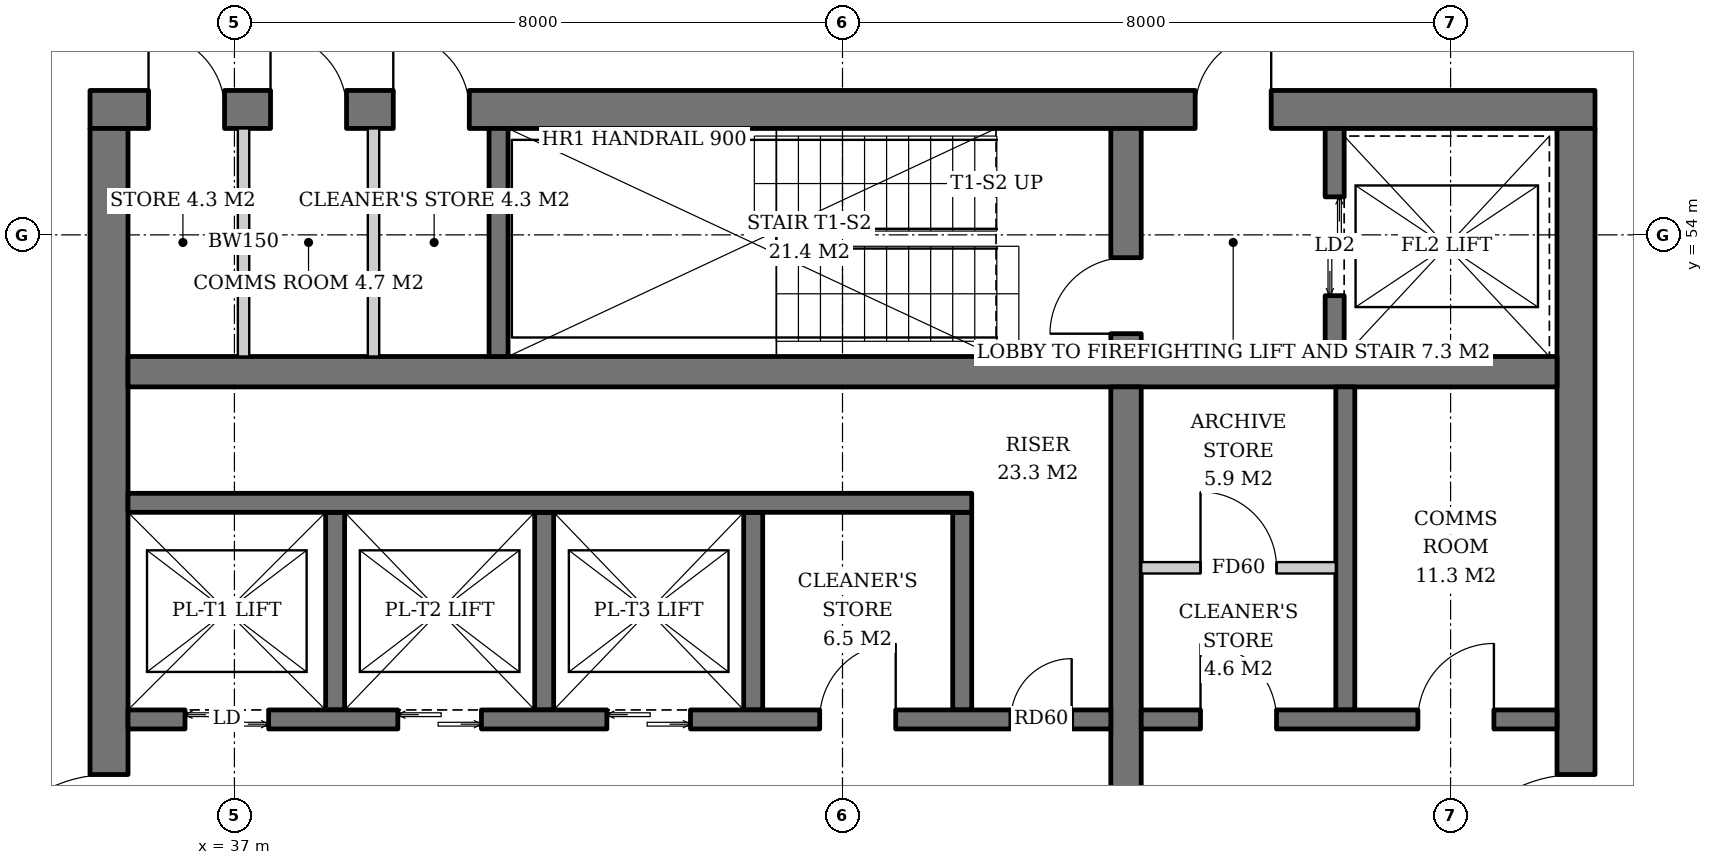
"""IFC4 building model, lengths in metres.
Left out: names, types, materials, properties, quantities, classifications, styles, units other than length and angle.
Written with IfcOpenShell. Run it as: python <this file> out.ifc"""

import sys

from ifc_helpers import new_model, si_unit, direction, frame, frame_2d, origin, place, context, subcontext, project, spatial, rectangle, extrude, element, fill, save


model = new_model("IFC4")
c1 = context("Model", 3, precision=1e-05, world=origin(), true_north=direction((0.0, 1.0)))
c2 = subcontext(c1, "Body", "Model", "MODEL_VIEW")
j1 = project(units=[si_unit("LENGTHUNIT", "METRE"), si_unit("PLANEANGLEUNIT", "RADIAN")], contexts=[c1])
p1 = place(None, origin())
s1 = spatial("IfcSite", under=j1, at=p1, CompositionType="ELEMENT")
p2 = place(p1, origin())
s2 = spatial("IfcBuilding", under=s1, at=p2, CompositionType="ELEMENT")
p3 = place(p2, frame((0.0, 0.0, 249.0)))
s3 = spatial("IfcBuildingStorey", under=s2, at=p3, CompositionType="ELEMENT", Elevation=249.0)
p4 = place(p3, frame((35.1, 55.65, 0.0), z_axis=(0.0, 0.0, 1.0), x_axis=(1.0, 0.0, 0.0)))
e1 = element("IfcWall", 1, at=p4, inside=s3, PredefinedType="SHEAR", context=c2, shape_type="SweptSolid", body=[
    extrude(rectangle(XDim=19.8, YDim=0.5, at=frame_2d((9.9, 0.0))), origin(), (0.0, 0.0, 1.0), 3.8),
])
p5 = place(p4, frame((14.54, 0.0, 0.0)))
e2 = element("IfcOpeningElement", 2, at=p5, cuts=e1, PredefinedType="OPENING", context=c2, shape_type="SweptSolid", body=[
    extrude(rectangle(XDim=1.0, YDim=2.1, at=frame_2d((0.5, 1.05))), frame((0.0, 0.26, 0.0), z_axis=(0.0, -1.0, 0.0), x_axis=(1.0, 0.0, 0.0)), (0.0, 0.0, 1.0), 0.52),
])
p6 = place(p4, frame((0.77, 0.0, 0.0)))
e3 = element("IfcOpeningElement", 3, at=p6, cuts=e1, PredefinedType="OPENING", context=c2, shape_type="SweptSolid", body=[
    extrude(rectangle(XDim=1.0, YDim=2.1, at=frame_2d((0.5, 1.05))), frame((0.0, 0.26, 0.0), z_axis=(0.0, -1.0, 0.0), x_axis=(1.0, 0.0, 0.0)), (0.0, 0.0, 1.0), 0.52),
])
p7 = place(p4, frame((2.375, 0.0, 0.0)))
e4 = element("IfcOpeningElement", 4, at=p7, cuts=e1, PredefinedType="OPENING", context=c2, shape_type="SweptSolid", body=[
    extrude(rectangle(XDim=1.0, YDim=2.1, at=frame_2d((0.5, 1.05))), frame((0.0, 0.26, 0.0), z_axis=(0.0, -1.0, 0.0), x_axis=(1.0, 0.0, 0.0)), (0.0, 0.0, 1.0), 0.52),
])
p8 = place(p4, frame((3.99, 0.0, 0.0)))
e5 = element("IfcOpeningElement", 5, at=p8, cuts=e1, PredefinedType="OPENING", context=c2, shape_type="SweptSolid", body=[
    extrude(rectangle(XDim=1.0, YDim=2.1, at=frame_2d((0.5, 1.05))), frame((0.0, 0.26, 0.0), z_axis=(0.0, -1.0, 0.0), x_axis=(1.0, 0.0, 0.0)), (0.0, 0.0, 1.0), 0.52),
])
p9 = place(p3, frame((35.35, 36.6, 0.0), z_axis=(0.0, 0.0, 1.0), x_axis=(0.0, 1.0, 0.0)))
e6 = element("IfcWall", 6, at=p9, inside=s3, PredefinedType="SHEAR", context=c2, shape_type="SweptSolid", body=[
    extrude(rectangle(XDim=18.8, YDim=0.5, at=frame_2d((9.4, 0.0))), origin(), (0.0, 0.0, 1.0), 3.8),
])
p10 = place(p9, frame((8.5, 0.0, 0.0)))
e7 = element("IfcOpeningElement", 7, at=p10, cuts=e6, PredefinedType="OPENING", context=c2, shape_type="SweptSolid", body=[
    extrude(rectangle(XDim=1.8, YDim=2.4, at=frame_2d((0.9, 1.2))), frame((0.0, 0.26, 0.0), z_axis=(0.0, -1.0, 0.0), x_axis=(1.0, 0.0, 0.0)), (0.0, 0.0, 1.0), 0.52),
])
p11 = place(p3, frame((54.65, 36.6, 0.0), z_axis=(0.0, 0.0, 1.0), x_axis=(0.0, 1.0, 0.0)))
e8 = element("IfcWall", 8, at=p11, inside=s3, PredefinedType="SHEAR", context=c2, shape_type="SweptSolid", body=[
    extrude(rectangle(XDim=18.8, YDim=0.5, at=frame_2d((9.4, 0.0))), origin(), (0.0, 0.0, 1.0), 3.8),
])
p12 = place(p11, frame((8.5, 0.0, 0.0)))
e9 = element("IfcOpeningElement", 9, at=p12, cuts=e8, PredefinedType="OPENING", context=c2, shape_type="SweptSolid", body=[
    extrude(rectangle(XDim=1.8, YDim=2.4, at=frame_2d((0.9, 1.2))), frame((0.0, 0.26, 0.0), z_axis=(0.0, -1.0, 0.0), x_axis=(1.0, 0.0, 0.0)), (0.0, 0.0, 1.0), 0.52),
])
p13 = place(p3, frame((35.6, 52.2, 0.0), z_axis=(0.0, 0.0, 1.0), x_axis=(1.0, 0.0, 0.0)))
e10 = element("IfcWall", 10, at=p13, inside=s3, PredefinedType="SHEAR", context=c2, shape_type="SweptSolid", body=[
    extrude(rectangle(XDim=18.8, YDim=0.4, at=frame_2d((9.4, 0.0))), origin(), (0.0, 0.0, 1.0), 3.8),
])
p14 = place(p3, frame((48.73, 40.0, 0.0), z_axis=(0.0, 0.0, 1.0), x_axis=(0.0, 1.0, 0.0)))
e11 = element("IfcWall", 11, at=p14, inside=s3, PredefinedType="SHEAR", context=c2, shape_type="SweptSolid", body=[
    extrude(rectangle(XDim=12.0, YDim=0.4, at=frame_2d((6.0, 0.0))), origin(), (0.0, 0.0, 1.0), 3.8),
])
p15 = place(p3, frame((48.73, 52.4, 0.0), z_axis=(0.0, 0.0, 1.0), x_axis=(0.0, 1.0, 0.0)))
e12 = element("IfcWall", 12, at=p15, inside=s3, PredefinedType="SHEAR", context=c2, shape_type="SweptSolid", body=[
    extrude(rectangle(XDim=3.0, YDim=0.4, at=frame_2d((1.5, 0.0))), origin(), (0.0, 0.0, 1.0), 3.8),
])
p16 = place(p15, frame((0.3, 0.0, 0.0)))
e13 = element("IfcOpeningElement", 13, at=p16, cuts=e12, PredefinedType="OPENING", context=c2, shape_type="SweptSolid", body=[
    extrude(rectangle(XDim=1.0, YDim=2.1, at=frame_2d((0.5, 1.05))), frame((0.0, 0.21, 0.0), z_axis=(0.0, -1.0, 0.0), x_axis=(1.0, 0.0, 0.0)), (0.0, 0.0, 1.0), 0.42),
])
p17 = place(p3, frame((40.475, 52.4, 0.0), z_axis=(0.0, 0.0, 1.0), x_axis=(0.0, 1.0, 0.0)))
e14 = element("IfcWall", 14, at=p17, inside=s3, PredefinedType="SHEAR", context=c2, shape_type="SweptSolid", body=[
    extrude(rectangle(XDim=3.0, YDim=0.25, at=frame_2d((1.5, 0.0))), origin(), (0.0, 0.0, 1.0), 3.8),
])
p18 = place(p3, frame((51.475, 52.4, 0.0), z_axis=(0.0, 0.0, 1.0), x_axis=(0.0, 1.0, 0.0)))
e15 = element("IfcWall", 15, at=p18, inside=s3, PredefinedType="SHEAR", context=c2, shape_type="SweptSolid", body=[
    extrude(rectangle(XDim=3.0, YDim=0.25, at=frame_2d((1.5, 0.0))), origin(), (0.0, 0.0, 1.0), 3.8),
])
p19 = place(p18, frame((0.8, 0.0, 0.0)))
e16 = element("IfcOpeningElement", 16, at=p19, cuts=e15, PredefinedType="OPENING", context=c2, shape_type="SweptSolid", body=[
    extrude(rectangle(XDim=1.3, YDim=2.2, at=frame_2d((0.65, 1.1))), frame((0.0, 0.135, 0.0), z_axis=(0.0, -1.0, 0.0), x_axis=(1.0, 0.0, 0.0)), (0.0, 0.0, 1.0), 0.27),
])
for number, where, z_axis, x_axis in (
    (17, (38.325, 47.75, 0.0), (0.0, 0.0, 1.0), (0.0, 1.0, 0.0)),
    (18, (41.075, 47.75, 0.0), (0.0, 0.0, 1.0), (0.0, 1.0, 0.0)),
    (19, (43.825, 47.75, 0.0), (0.0, 0.0, 1.0), (0.0, 1.0, 0.0)),
    (20, (46.575, 47.75, 0.0), (0.0, 0.0, 1.0), (0.0, 1.0, 0.0)),
):
    element("IfcWall", number, at=place(p3, frame(where, z_axis=z_axis, x_axis=x_axis)), inside=s3, PredefinedType="SHEAR", context=c2, shape_type="SweptSolid", body=[
        extrude(rectangle(XDim=2.6, YDim=0.25, at=frame_2d((1.3, 0.0))), origin(), (0.0, 0.0, 1.0), 3.8),
    ])
p20 = place(p3, frame((35.6, 50.475, 0.0), z_axis=(0.0, 0.0, 1.0), x_axis=(1.0, 0.0, 0.0)))
e21 = element("IfcWall", 21, at=p20, inside=s3, PredefinedType="SHEAR", context=c2, shape_type="SweptSolid", body=[
    extrude(rectangle(XDim=11.1, YDim=0.25, at=frame_2d((5.55, 0.0))), origin(), (0.0, 0.0, 1.0), 3.8),
])
p21 = place(p3, frame((35.6, 47.625, 0.0), z_axis=(0.0, 0.0, 1.0), x_axis=(1.0, 0.0, 0.0)))
e22 = element("IfcWall", 22, at=p21, inside=s3, PredefinedType="SHEAR", context=c2, shape_type="SweptSolid", body=[
    extrude(rectangle(XDim=12.93, YDim=0.25, at=frame_2d((6.465, 0.0))), origin(), (0.0, 0.0, 1.0), 3.8),
])
p22 = place(p21, frame((0.75, 0.0, 0.0)))
e23 = element("IfcOpeningElement", 23, at=p22, cuts=e22, PredefinedType="OPENING", context=c2, shape_type="SweptSolid", body=[
    extrude(rectangle(XDim=1.1, YDim=2.2, at=frame_2d((0.55, 1.1))), frame((0.0, 0.135, 0.0), z_axis=(0.0, -1.0, 0.0), x_axis=(1.0, 0.0, 0.0)), (0.0, 0.0, 1.0), 0.27),
])
p23 = place(p21, frame((3.55, 0.0, 0.0)))
e24 = element("IfcOpeningElement", 24, at=p23, cuts=e22, PredefinedType="OPENING", context=c2, shape_type="SweptSolid", body=[
    extrude(rectangle(XDim=1.1, YDim=2.2, at=frame_2d((0.55, 1.1))), frame((0.0, 0.135, 0.0), z_axis=(0.0, -1.0, 0.0), x_axis=(1.0, 0.0, 0.0)), (0.0, 0.0, 1.0), 0.27),
])
p24 = place(p21, frame((6.3, 0.0, 0.0)))
e25 = element("IfcOpeningElement", 25, at=p24, cuts=e22, PredefinedType="OPENING", context=c2, shape_type="SweptSolid", body=[
    extrude(rectangle(XDim=1.1, YDim=2.2, at=frame_2d((0.55, 1.1))), frame((0.0, 0.135, 0.0), z_axis=(0.0, -1.0, 0.0), x_axis=(1.0, 0.0, 0.0)), (0.0, 0.0, 1.0), 0.27),
])
p25 = place(p21, frame((9.1, 0.0, 0.0)))
e26 = element("IfcOpeningElement", 26, at=p25, cuts=e22, PredefinedType="OPENING", context=c2, shape_type="SweptSolid", body=[
    extrude(rectangle(XDim=1.0, YDim=2.1, at=frame_2d((0.5, 1.05))), frame((0.0, 0.135, 0.0), z_axis=(0.0, -1.0, 0.0), x_axis=(1.0, 0.0, 0.0)), (0.0, 0.0, 1.0), 0.27),
])
p26 = place(p21, frame((11.615, 0.0, 0.0)))
e27 = element("IfcOpeningElement", 27, at=p26, cuts=e22, PredefinedType="OPENING", context=c2, shape_type="SweptSolid", body=[
    extrude(rectangle(XDim=0.8, YDim=2.0, at=frame_2d((0.4, 1.0))), frame((0.0, 0.135, 0.0), z_axis=(0.0, -1.0, 0.0), x_axis=(1.0, 0.0, 0.0)), (0.0, 0.0, 1.0), 0.27),
])
p27 = place(p3, frame((51.615, 47.75, 0.0), z_axis=(0.0, 0.0, 1.0), x_axis=(0.0, 1.0, 0.0)))
e28 = element("IfcWall", 28, at=p27, inside=s3, PredefinedType="SHEAR", context=c2, shape_type="SweptSolid", body=[
    extrude(rectangle(XDim=4.25, YDim=0.25, at=frame_2d((2.125, 0.0))), origin(), (0.0, 0.0, 1.0), 3.8),
])
p28 = place(p3, frame((48.93, 47.625, 0.0), z_axis=(0.0, 0.0, 1.0), x_axis=(1.0, 0.0, 0.0)))
e29 = element("IfcWall", 29, at=p28, inside=s3, PredefinedType="SHEAR", context=c2, shape_type="SweptSolid", body=[
    extrude(rectangle(XDim=5.47, YDim=0.25, at=frame_2d((2.735, 0.0))), origin(), (0.0, 0.0, 1.0), 3.8),
])
p29 = place(p28, frame((0.78, 0.0, 0.0)))
e30 = element("IfcOpeningElement", 30, at=p29, cuts=e29, PredefinedType="OPENING", context=c2, shape_type="SweptSolid", body=[
    extrude(rectangle(XDim=1.0, YDim=2.1, at=frame_2d((0.5, 1.05))), frame((0.0, 0.135, 0.0), z_axis=(0.0, -1.0, 0.0), x_axis=(1.0, 0.0, 0.0)), (0.0, 0.0, 1.0), 0.27),
])
p30 = place(p28, frame((3.64, 0.0, 0.0)))
e31 = element("IfcOpeningElement", 31, at=p30, cuts=e29, PredefinedType="OPENING", context=c2, shape_type="SweptSolid", body=[
    extrude(rectangle(XDim=1.0, YDim=2.1, at=frame_2d((0.5, 1.05))), frame((0.0, 0.135, 0.0), z_axis=(0.0, -1.0, 0.0), x_axis=(1.0, 0.0, 0.0)), (0.0, 0.0, 1.0), 0.27),
])
for number, where, z_axis, x_axis in (
    (32, (37.12, 52.4, 0.0), (0.0, 0.0, 1.0), (0.0, 1.0, 0.0)),
    (33, (38.83, 52.4, 0.0), (0.0, 0.0, 1.0), (0.0, 1.0, 0.0)),
):
    element("IfcWall", number, at=place(p3, frame(where, z_axis=z_axis, x_axis=x_axis)), inside=s3, PredefinedType="SOLIDWALL", context=c2, shape_type="SweptSolid", body=[
        extrude(rectangle(XDim=3.0, YDim=0.15, at=frame_2d((1.5, 0.0))), origin(), (0.0, 0.0, 1.0), 3.62),
    ])
p31 = place(p3, frame((48.93, 49.62, 0.0), z_axis=(0.0, 0.0, 1.0), x_axis=(1.0, 0.0, 0.0)))
e34 = element("IfcWall", 34, at=p31, inside=s3, PredefinedType="SOLIDWALL", context=c2, shape_type="SweptSolid", body=[
    extrude(rectangle(XDim=2.56, YDim=0.15, at=frame_2d((1.28, 0.0))), origin(), (0.0, 0.0, 1.0), 3.62),
])
p32 = place(p31, frame((0.78, 0.0, 0.0)))
e35 = element("IfcOpeningElement", 35, at=p32, cuts=e34, PredefinedType="OPENING", context=c2, shape_type="SweptSolid", body=[
    extrude(rectangle(XDim=1.0, YDim=2.1, at=frame_2d((0.5, 1.05))), frame((0.0, 0.085, 0.0), z_axis=(0.0, -1.0, 0.0), x_axis=(1.0, 0.0, 0.0)), (0.0, 0.0, 1.0), 0.17),
])
p33 = place(p19, origin())
e36 = element("IfcDoor", 36, at=p33, inside=s3, OperationType="DOUBLE_DOOR_SLIDING", PredefinedType="DOOR", context=c2, shape_type="SweptSolid", body=[
    extrude(rectangle(XDim=1.3, YDim=2.2, at=frame_2d((0.65, 1.1))), frame((0.0, 0.025, 0.0), z_axis=(0.0, -1.0, 0.0), x_axis=(1.0, 0.0, 0.0)), (0.0, 0.0, 1.0), 0.05),
])
fill(e16, e36)
p34 = place(p22, origin())
e37 = element("IfcDoor", 37, at=p34, inside=s3, OperationType="DOUBLE_DOOR_SLIDING", PredefinedType="DOOR", context=c2, shape_type="SweptSolid", body=[
    extrude(rectangle(XDim=1.1, YDim=2.2, at=frame_2d((0.55, 1.1))), frame((0.0, 0.025, 0.0), z_axis=(0.0, -1.0, 0.0), x_axis=(1.0, 0.0, 0.0)), (0.0, 0.0, 1.0), 0.05),
])
fill(e23, e37)
p35 = place(p23, origin())
e38 = element("IfcDoor", 38, at=p35, inside=s3, OperationType="DOUBLE_DOOR_SLIDING", PredefinedType="DOOR", context=c2, shape_type="SweptSolid", body=[
    extrude(rectangle(XDim=1.1, YDim=2.2, at=frame_2d((0.55, 1.1))), frame((0.0, 0.025, 0.0), z_axis=(0.0, -1.0, 0.0), x_axis=(1.0, 0.0, 0.0)), (0.0, 0.0, 1.0), 0.05),
])
fill(e24, e38)
p36 = place(p24, origin())
e39 = element("IfcDoor", 39, at=p36, inside=s3, OperationType="DOUBLE_DOOR_SLIDING", PredefinedType="DOOR", context=c2, shape_type="SweptSolid", body=[
    extrude(rectangle(XDim=1.1, YDim=2.2, at=frame_2d((0.55, 1.1))), frame((0.0, 0.025, 0.0), z_axis=(0.0, -1.0, 0.0), x_axis=(1.0, 0.0, 0.0)), (0.0, 0.0, 1.0), 0.05),
])
fill(e25, e39)
p37 = place(p25, origin())
e40 = element("IfcDoor", 40, at=p37, inside=s3, OperationType="SINGLE_SWING_RIGHT", PredefinedType="DOOR", context=c2, shape_type="SweptSolid", body=[
    extrude(rectangle(XDim=1.0, YDim=2.1, at=frame_2d((0.5, 1.05))), frame((0.0, 0.025, 0.0), z_axis=(0.0, -1.0, 0.0), x_axis=(1.0, 0.0, 0.0)), (0.0, 0.0, 1.0), 0.05),
])
fill(e26, e40)
p38 = place(p26, origin())
e41 = element("IfcDoor", 41, at=p38, inside=s3, OperationType="SINGLE_SWING_RIGHT", PredefinedType="DOOR", context=c2, shape_type="SweptSolid", body=[
    extrude(rectangle(XDim=0.8, YDim=2.0, at=frame_2d((0.4, 1.0))), frame((0.0, 0.025, 0.0), z_axis=(0.0, -1.0, 0.0), x_axis=(1.0, 0.0, 0.0)), (0.0, 0.0, 1.0), 0.05),
])
fill(e27, e41)
p39 = place(p29, origin())
e42 = element("IfcDoor", 42, at=p39, inside=s3, OperationType="SINGLE_SWING_LEFT", PredefinedType="DOOR", context=c2, shape_type="SweptSolid", body=[
    extrude(rectangle(XDim=1.0, YDim=2.1, at=frame_2d((0.5, 1.05))), frame((0.0, 0.025, 0.0), z_axis=(0.0, -1.0, 0.0), x_axis=(1.0, 0.0, 0.0)), (0.0, 0.0, 1.0), 0.05),
])
fill(e30, e42)
p40 = place(p30, origin())
e43 = element("IfcDoor", 43, at=p40, inside=s3, OperationType="SINGLE_SWING_RIGHT", PredefinedType="DOOR", context=c2, shape_type="SweptSolid", body=[
    extrude(rectangle(XDim=1.0, YDim=2.1, at=frame_2d((0.5, 1.05))), frame((0.0, 0.025, 0.0), z_axis=(0.0, -1.0, 0.0), x_axis=(1.0, 0.0, 0.0)), (0.0, 0.0, 1.0), 0.05),
])
fill(e31, e43)
p41 = place(p32, origin())
e44 = element("IfcDoor", 44, at=p41, inside=s3, OperationType="SINGLE_SWING_LEFT", PredefinedType="DOOR", context=c2, shape_type="SweptSolid", body=[
    extrude(rectangle(XDim=1.0, YDim=2.1, at=frame_2d((0.5, 1.05))), frame((0.0, 0.025, 0.0), z_axis=(0.0, -1.0, 0.0), x_axis=(1.0, 0.0, 0.0)), (0.0, 0.0, 1.0), 0.05),
])
fill(e35, e44)
p42 = place(p16, origin())
e45 = element("IfcDoor", 45, at=p42, inside=s3, OperationType="SINGLE_SWING_LEFT", PredefinedType="DOOR", context=c2, shape_type="SweptSolid", body=[
    extrude(rectangle(XDim=1.0, YDim=2.1, at=frame_2d((0.5, 1.05))), frame((0.0, 0.025, 0.0), z_axis=(0.0, -1.0, 0.0), x_axis=(1.0, 0.0, 0.0)), (0.0, 0.0, 1.0), 0.05),
])
fill(e13, e45)
p43 = place(p5, origin())
e46 = element("IfcDoor", 46, at=p43, inside=s3, OperationType="SINGLE_SWING_RIGHT", PredefinedType="DOOR", context=c2, shape_type="SweptSolid", body=[
    extrude(rectangle(XDim=1.0, YDim=2.1, at=frame_2d((0.5, 1.05))), frame((0.0, 0.025, 0.0), z_axis=(0.0, -1.0, 0.0), x_axis=(1.0, 0.0, 0.0)), (0.0, 0.0, 1.0), 0.05),
])
fill(e2, e46)
p44 = place(p10, origin())
e47 = element("IfcDoor", 47, at=p44, inside=s3, OperationType="DOUBLE_DOOR_SINGLE_SWING", PredefinedType="DOOR", context=c2, shape_type="SweptSolid", body=[
    extrude(rectangle(XDim=1.8, YDim=2.4, at=frame_2d((0.9, 1.2))), frame((0.0, 0.025, 0.0), z_axis=(0.0, -1.0, 0.0), x_axis=(1.0, 0.0, 0.0)), (0.0, 0.0, 1.0), 0.05),
])
fill(e7, e47)
p45 = place(p12, origin())
e48 = element("IfcDoor", 48, at=p45, inside=s3, OperationType="DOUBLE_DOOR_SINGLE_SWING", PredefinedType="DOOR", context=c2, shape_type="SweptSolid", body=[
    extrude(rectangle(XDim=1.8, YDim=2.4, at=frame_2d((0.9, 1.2))), frame((0.0, 0.025, 0.0), z_axis=(0.0, -1.0, 0.0), x_axis=(1.0, 0.0, 0.0)), (0.0, 0.0, 1.0), 0.05),
])
fill(e9, e48)
p46 = place(p6, origin())
e49 = element("IfcDoor", 49, at=p46, inside=s3, OperationType="SINGLE_SWING_LEFT", PredefinedType="DOOR", context=c2, shape_type="SweptSolid", body=[
    extrude(rectangle(XDim=1.0, YDim=2.1, at=frame_2d((0.5, 1.05))), frame((0.0, -0.19, 0.0), z_axis=(0.0, -1.0, 0.0), x_axis=(1.0, 0.0, 0.0)), (0.0, 0.0, 1.0), 0.05),
])
fill(e3, e49)
p47 = place(p7, origin())
e50 = element("IfcDoor", 50, at=p47, inside=s3, OperationType="SINGLE_SWING_LEFT", PredefinedType="DOOR", context=c2, shape_type="SweptSolid", body=[
    extrude(rectangle(XDim=1.0, YDim=2.1, at=frame_2d((0.5, 1.05))), frame((0.0, -0.19, 0.0), z_axis=(0.0, -1.0, 0.0), x_axis=(1.0, 0.0, 0.0)), (0.0, 0.0, 1.0), 0.05),
])
fill(e4, e50)
p48 = place(p8, origin())
e51 = element("IfcDoor", 51, at=p48, inside=s3, OperationType="SINGLE_SWING_LEFT", PredefinedType="DOOR", context=c2, shape_type="SweptSolid", body=[
    extrude(rectangle(XDim=1.0, YDim=2.1, at=frame_2d((0.5, 1.05))), frame((0.0, -0.19, 0.0), z_axis=(0.0, -1.0, 0.0), x_axis=(1.0, 0.0, 0.0)), (0.0, 0.0, 1.0), 0.05),
])
fill(e5, e51)
save(model, sys.argv[1])
